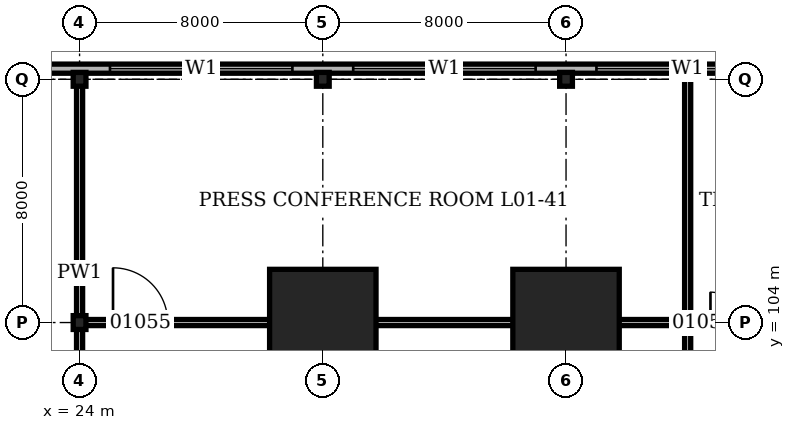
"""IFC4 building model, lengths in metres.
Left out: names, types, materials, properties, quantities, classifications, styles, units other than length and angle.
Written with IfcOpenShell. Run it as: python <this file> out.ifc"""

import sys

from ifc_helpers import new_model, si_unit, direction, frame, frame_2d, origin, origin_2d, place, context, subcontext, project, spatial, rectangle, hollow_rectangle, i_section, extrude, element, fill, save


model = new_model("IFC4")
c1 = context("Model", 3, precision=1e-05, world=origin(), true_north=direction((0.0, 1.0)))
c2 = subcontext(c1, "Body", "Model", "MODEL_VIEW")
j1 = project(units=[si_unit("LENGTHUNIT", "METRE"), si_unit("PLANEANGLEUNIT", "RADIAN")], contexts=[c1])
p1 = place(None, origin())
s1 = spatial("IfcSite", under=j1, at=p1, CompositionType="ELEMENT")
p2 = place(p1, origin())
s2 = spatial("IfcBuilding", under=s1, at=p2, CompositionType="ELEMENT")
p3 = place(p2, frame((0.0, 0.0, 4.9)))
s3 = spatial("IfcBuildingStorey", under=s2, at=p3, CompositionType="ELEMENT", Elevation=4.9)
for number, where, z_axis, x_axis in (
    (1, (24.0, 104.0, 0.0), (0.0, 0.0, 1.0), (1.0, 0.0, 0.0)),
    (2, (24.0, 112.0, 0.0), (0.0, 0.0, 1.0), (1.0, 0.0, 0.0)),
):
    element("IfcColumn", number, at=place(p3, frame(where, z_axis=z_axis, x_axis=x_axis)), inside=s3, PredefinedType="COLUMN", context=c2, shape_type="SweptSolid", body=[
        extrude(i_section(OverallWidth=0.419, OverallDepth=0.455, WebThickness=0.042, FlangeThickness=0.068, at=origin_2d()), origin(), (0.0, 0.0, 1.0), 5.0),
    ])
p4 = place(p3, frame((32.0, 104.0, 0.0), z_axis=(0.0, 0.0, 1.0), x_axis=(1.0, 0.0, 0.0)))
e3 = element("IfcColumn", 3, at=p4, inside=s3, PredefinedType="COLUMN", context=c2, shape_type="SweptSolid", body=[
    extrude(hollow_rectangle(XDim=3.5, YDim=3.5, WallThickness=0.5, at=origin_2d()), origin(), (0.0, 0.0, 1.0), 5.0),
])
p5 = place(p3, frame((32.0, 112.0, 0.0), z_axis=(0.0, 0.0, 1.0), x_axis=(1.0, 0.0, 0.0)))
e4 = element("IfcColumn", 4, at=p5, inside=s3, PredefinedType="COLUMN", context=c2, shape_type="SweptSolid", body=[
    extrude(i_section(OverallWidth=0.419, OverallDepth=0.455, WebThickness=0.042, FlangeThickness=0.068, at=origin_2d()), origin(), (0.0, 0.0, 1.0), 5.0),
])
p6 = place(p3, frame((40.0, 104.0, 0.0), z_axis=(0.0, 0.0, 1.0), x_axis=(1.0, 0.0, 0.0)))
e5 = element("IfcColumn", 5, at=p6, inside=s3, PredefinedType="COLUMN", context=c2, shape_type="SweptSolid", body=[
    extrude(hollow_rectangle(XDim=3.5, YDim=3.5, WallThickness=0.5, at=origin_2d()), origin(), (0.0, 0.0, 1.0), 5.0),
])
p7 = place(p3, frame((40.0, 112.0, 0.0), z_axis=(0.0, 0.0, 1.0), x_axis=(1.0, 0.0, 0.0)))
e6 = element("IfcColumn", 6, at=p7, inside=s3, PredefinedType="COLUMN", context=c2, shape_type="SweptSolid", body=[
    extrude(i_section(OverallWidth=0.419, OverallDepth=0.455, WebThickness=0.042, FlangeThickness=0.068, at=origin_2d()), origin(), (0.0, 0.0, 1.0), 5.0),
])
p8 = place(p3, frame((112.35, 112.35, 0.0), z_axis=(0.0, 0.0, 1.0), x_axis=(-1.0, 0.0, 0.0)))
e7 = element("IfcWall", 7, at=p8, inside=s3, PredefinedType="SOLIDWALL", context=c2, shape_type="SweptSolid", body=[
    extrude(rectangle(XDim=112.7, YDim=0.3, at=frame_2d((56.35, 0.0))), origin(), (0.0, 0.0, 1.0), 5.0),
])
p9 = place(p8, frame((1.35, 0.0, 1.0)))
e8 = element("IfcOpeningElement", 8, at=p9, cuts=e7, PredefinedType="OPENING", context=c2, shape_type="SweptSolid", body=[
    extrude(rectangle(XDim=6.0, YDim=1.5, at=frame_2d((3.0, 0.75))), frame((0.0, 0.16, 0.0), z_axis=(0.0, -1.0, 0.0), x_axis=(1.0, 0.0, 0.0)), (0.0, 0.0, 1.0), 0.32),
])
p10 = place(p8, frame((9.35, 0.0, 1.0)))
e9 = element("IfcOpeningElement", 9, at=p10, cuts=e7, PredefinedType="OPENING", context=c2, shape_type="SweptSolid", body=[
    extrude(rectangle(XDim=6.0, YDim=1.5, at=frame_2d((3.0, 0.75))), frame((0.0, 0.16, 0.0), z_axis=(0.0, -1.0, 0.0), x_axis=(1.0, 0.0, 0.0)), (0.0, 0.0, 1.0), 0.32),
])
p11 = place(p8, frame((17.35, 0.0, 1.0)))
e10 = element("IfcOpeningElement", 10, at=p11, cuts=e7, PredefinedType="OPENING", context=c2, shape_type="SweptSolid", body=[
    extrude(rectangle(XDim=6.0, YDim=1.5, at=frame_2d((3.0, 0.75))), frame((0.0, 0.16, 0.0), z_axis=(0.0, -1.0, 0.0), x_axis=(1.0, 0.0, 0.0)), (0.0, 0.0, 1.0), 0.32),
])
p12 = place(p8, frame((25.35, 0.0, 1.0)))
e11 = element("IfcOpeningElement", 11, at=p12, cuts=e7, PredefinedType="OPENING", context=c2, shape_type="SweptSolid", body=[
    extrude(rectangle(XDim=6.0, YDim=1.5, at=frame_2d((3.0, 0.75))), frame((0.0, 0.16, 0.0), z_axis=(0.0, -1.0, 0.0), x_axis=(1.0, 0.0, 0.0)), (0.0, 0.0, 1.0), 0.32),
])
p13 = place(p8, frame((33.35, 0.0, 1.0)))
e12 = element("IfcOpeningElement", 12, at=p13, cuts=e7, PredefinedType="OPENING", context=c2, shape_type="SweptSolid", body=[
    extrude(rectangle(XDim=6.0, YDim=1.5, at=frame_2d((3.0, 0.75))), frame((0.0, 0.16, 0.0), z_axis=(0.0, -1.0, 0.0), x_axis=(1.0, 0.0, 0.0)), (0.0, 0.0, 1.0), 0.32),
])
p14 = place(p8, frame((41.35, 0.0, 1.0)))
e13 = element("IfcOpeningElement", 13, at=p14, cuts=e7, PredefinedType="OPENING", context=c2, shape_type="SweptSolid", body=[
    extrude(rectangle(XDim=6.0, YDim=1.5, at=frame_2d((3.0, 0.75))), frame((0.0, 0.16, 0.0), z_axis=(0.0, -1.0, 0.0), x_axis=(1.0, 0.0, 0.0)), (0.0, 0.0, 1.0), 0.32),
])
p15 = place(p8, frame((49.35, 0.0, 1.0)))
e14 = element("IfcOpeningElement", 14, at=p15, cuts=e7, PredefinedType="OPENING", context=c2, shape_type="SweptSolid", body=[
    extrude(rectangle(XDim=6.0, YDim=1.5, at=frame_2d((3.0, 0.75))), frame((0.0, 0.16, 0.0), z_axis=(0.0, -1.0, 0.0), x_axis=(1.0, 0.0, 0.0)), (0.0, 0.0, 1.0), 0.32),
])
p16 = place(p8, frame((57.35, 0.0, 1.0)))
e15 = element("IfcOpeningElement", 15, at=p16, cuts=e7, PredefinedType="OPENING", context=c2, shape_type="SweptSolid", body=[
    extrude(rectangle(XDim=6.0, YDim=1.5, at=frame_2d((3.0, 0.75))), frame((0.0, 0.16, 0.0), z_axis=(0.0, -1.0, 0.0), x_axis=(1.0, 0.0, 0.0)), (0.0, 0.0, 1.0), 0.32),
])
p17 = place(p8, frame((65.35, 0.0, 1.0)))
e16 = element("IfcOpeningElement", 16, at=p17, cuts=e7, PredefinedType="OPENING", context=c2, shape_type="SweptSolid", body=[
    extrude(rectangle(XDim=6.0, YDim=1.5, at=frame_2d((3.0, 0.75))), frame((0.0, 0.16, 0.0), z_axis=(0.0, -1.0, 0.0), x_axis=(1.0, 0.0, 0.0)), (0.0, 0.0, 1.0), 0.32),
])
p18 = place(p8, frame((73.35, 0.0, 1.0)))
e17 = element("IfcOpeningElement", 17, at=p18, cuts=e7, PredefinedType="OPENING", context=c2, shape_type="SweptSolid", body=[
    extrude(rectangle(XDim=6.0, YDim=1.5, at=frame_2d((3.0, 0.75))), frame((0.0, 0.16, 0.0), z_axis=(0.0, -1.0, 0.0), x_axis=(1.0, 0.0, 0.0)), (0.0, 0.0, 1.0), 0.32),
])
p19 = place(p8, frame((81.35, 0.0, 1.0)))
e18 = element("IfcOpeningElement", 18, at=p19, cuts=e7, PredefinedType="OPENING", context=c2, shape_type="SweptSolid", body=[
    extrude(rectangle(XDim=6.0, YDim=1.5, at=frame_2d((3.0, 0.75))), frame((0.0, 0.16, 0.0), z_axis=(0.0, -1.0, 0.0), x_axis=(1.0, 0.0, 0.0)), (0.0, 0.0, 1.0), 0.32),
])
p20 = place(p8, frame((89.35, 0.0, 1.0)))
e19 = element("IfcOpeningElement", 19, at=p20, cuts=e7, PredefinedType="OPENING", context=c2, shape_type="SweptSolid", body=[
    extrude(rectangle(XDim=6.0, YDim=1.5, at=frame_2d((3.0, 0.75))), frame((0.0, 0.16, 0.0), z_axis=(0.0, -1.0, 0.0), x_axis=(1.0, 0.0, 0.0)), (0.0, 0.0, 1.0), 0.32),
])
p21 = place(p8, frame((97.35, 0.0, 1.0)))
e20 = element("IfcOpeningElement", 20, at=p21, cuts=e7, PredefinedType="OPENING", context=c2, shape_type="SweptSolid", body=[
    extrude(rectangle(XDim=6.0, YDim=1.5, at=frame_2d((3.0, 0.75))), frame((0.0, 0.16, 0.0), z_axis=(0.0, -1.0, 0.0), x_axis=(1.0, 0.0, 0.0)), (0.0, 0.0, 1.0), 0.32),
])
p22 = place(p8, frame((105.35, 0.0, 1.0)))
e21 = element("IfcOpeningElement", 21, at=p22, cuts=e7, PredefinedType="OPENING", context=c2, shape_type="SweptSolid", body=[
    extrude(rectangle(XDim=6.0, YDim=1.5, at=frame_2d((3.0, 0.75))), frame((0.0, 0.16, 0.0), z_axis=(0.0, -1.0, 0.0), x_axis=(1.0, 0.0, 0.0)), (0.0, 0.0, 1.0), 0.32),
])
p23 = place(p3, frame((24.1, 104.0, 0.0), z_axis=(0.0, 0.0, 1.0), x_axis=(1.0, 0.0, 0.0)))
e22 = element("IfcWall", 22, at=p23, inside=s3, PredefinedType="PARTITIONING", context=c2, shape_type="SweptSolid", body=[
    extrude(rectangle(XDim=79.8, YDim=0.2, at=frame_2d((39.9, 0.0))), origin(), (0.0, 0.0, 1.0), 4.028),
])
p24 = place(p23, frame((1.0, 0.0, 0.0)))
e23 = element("IfcOpeningElement", 23, at=p24, cuts=e22, PredefinedType="OPENING", context=c2, shape_type="SweptSolid", body=[
    extrude(rectangle(XDim=1.8, YDim=2.4, at=frame_2d((0.9, 1.2))), frame((0.0, 0.11, 0.0), z_axis=(0.0, -1.0, 0.0), x_axis=(1.0, 0.0, 0.0)), (0.0, 0.0, 1.0), 0.22),
])
p25 = place(p23, frame((20.65, 0.0, 0.0)))
e24 = element("IfcOpeningElement", 24, at=p25, cuts=e22, PredefinedType="OPENING", context=c2, shape_type="SweptSolid", body=[
    extrude(rectangle(XDim=1.0, YDim=2.1, at=frame_2d((0.5, 1.05))), frame((0.0, 0.11, 0.0), z_axis=(0.0, -1.0, 0.0), x_axis=(1.0, 0.0, 0.0)), (0.0, 0.0, 1.0), 0.22),
])
p26 = place(p23, frame((34.15, 0.0, 0.0)))
e25 = element("IfcOpeningElement", 25, at=p26, cuts=e22, PredefinedType="OPENING", context=c2, shape_type="SweptSolid", body=[
    extrude(rectangle(XDim=1.0, YDim=2.1, at=frame_2d((0.5, 1.05))), frame((0.0, 0.11, 0.0), z_axis=(0.0, -1.0, 0.0), x_axis=(1.0, 0.0, 0.0)), (0.0, 0.0, 1.0), 0.22),
])
p27 = place(p23, frame((44.65, 0.0, 0.0)))
e26 = element("IfcOpeningElement", 26, at=p27, cuts=e22, PredefinedType="OPENING", context=c2, shape_type="SweptSolid", body=[
    extrude(rectangle(XDim=1.0, YDim=2.1, at=frame_2d((0.5, 1.05))), frame((0.0, 0.11, 0.0), z_axis=(0.0, -1.0, 0.0), x_axis=(1.0, 0.0, 0.0)), (0.0, 0.0, 1.0), 0.22),
])
p28 = place(p23, frame((65.4, 0.0, 0.0)))
e27 = element("IfcOpeningElement", 27, at=p28, cuts=e22, PredefinedType="OPENING", context=c2, shape_type="SweptSolid", body=[
    extrude(rectangle(XDim=1.0, YDim=2.1, at=frame_2d((0.5, 1.05))), frame((0.0, 0.11, 0.0), z_axis=(0.0, -1.0, 0.0), x_axis=(1.0, 0.0, 0.0)), (0.0, 0.0, 1.0), 0.22),
])
p29 = place(p3, frame((24.0, 99.1, 0.0), z_axis=(0.0, 0.0, 1.0), x_axis=(0.0, 1.0, 0.0)))
e28 = element("IfcWall", 28, at=p29, inside=s3, PredefinedType="PARTITIONING", context=c2, shape_type="SweptSolid", body=[
    extrude(rectangle(XDim=13.05, YDim=0.2, at=frame_2d((6.525, 0.0))), origin(), (0.0, 0.0, 1.0), 4.028),
])
p30 = place(p3, frame((44.0, 92.6, 0.0), z_axis=(0.0, 0.0, 1.0), x_axis=(0.0, 1.0, 0.0)))
e29 = element("IfcWall", 29, at=p30, inside=s3, PredefinedType="PARTITIONING", context=c2, shape_type="SweptSolid", body=[
    extrude(rectangle(XDim=19.55, YDim=0.2, at=frame_2d((9.775, 0.0))), origin(), (0.0, 0.0, 1.0), 4.8),
])
p31 = place(p17, origin())
e30 = element("IfcWindow", 30, at=p31, inside=s3, PartitioningType="SINGLE_PANEL", PredefinedType="WINDOW", context=c2, shape_type="SweptSolid", body=[
    extrude(rectangle(XDim=6.0, YDim=1.5, at=frame_2d((3.0, 0.75))), frame((0.0, 0.03, 0.0), z_axis=(0.0, -1.0, 0.0), x_axis=(1.0, 0.0, 0.0)), (0.0, 0.0, 1.0), 0.06),
])
fill(e16, e30)
p32 = place(p18, origin())
e31 = element("IfcWindow", 31, at=p32, inside=s3, PartitioningType="SINGLE_PANEL", PredefinedType="WINDOW", context=c2, shape_type="SweptSolid", body=[
    extrude(rectangle(XDim=6.0, YDim=1.5, at=frame_2d((3.0, 0.75))), frame((0.0, 0.03, 0.0), z_axis=(0.0, -1.0, 0.0), x_axis=(1.0, 0.0, 0.0)), (0.0, 0.0, 1.0), 0.06),
])
fill(e17, e31)
p33 = place(p19, origin())
e32 = element("IfcWindow", 32, at=p33, inside=s3, PartitioningType="SINGLE_PANEL", PredefinedType="WINDOW", context=c2, shape_type="SweptSolid", body=[
    extrude(rectangle(XDim=6.0, YDim=1.5, at=frame_2d((3.0, 0.75))), frame((0.0, 0.03, 0.0), z_axis=(0.0, -1.0, 0.0), x_axis=(1.0, 0.0, 0.0)), (0.0, 0.0, 1.0), 0.06),
])
fill(e18, e32)
p34 = place(p24, origin())
e33 = element("IfcDoor", 33, at=p34, inside=s3, OperationType="DOUBLE_DOOR_DOUBLE_SWING", PredefinedType="DOOR", context=c2, shape_type="SweptSolid", body=[
    extrude(rectangle(XDim=1.8, YDim=2.4, at=frame_2d((0.9, 1.2))), frame((0.0, 0.1, 0.0), z_axis=(0.0, -1.0, 0.0), x_axis=(1.0, 0.0, 0.0)), (0.0, 0.0, 1.0), 0.199),
])
fill(e23, e33)
p35 = place(p25, origin())
e34 = element("IfcDoor", 34, at=p35, inside=s3, OperationType="SINGLE_SWING_LEFT", PredefinedType="DOOR", context=c2, shape_type="SweptSolid", body=[
    extrude(rectangle(XDim=1.0, YDim=2.1, at=frame_2d((0.5, 1.05))), frame((0.0, 0.1, 0.0), z_axis=(0.0, -1.0, 0.0), x_axis=(1.0, 0.0, 0.0)), (0.0, 0.0, 1.0), 0.199),
])
fill(e24, e34)
save(model, sys.argv[1])
